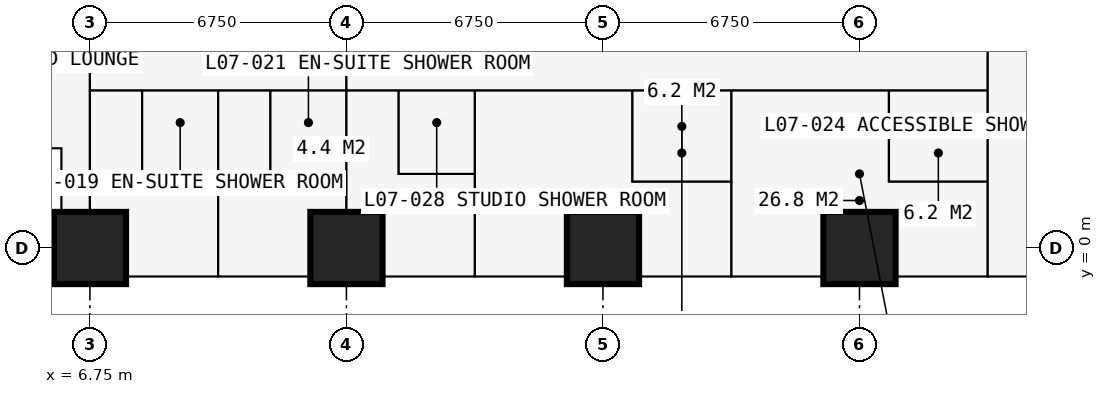
"""IFC4 building model, lengths in metres.
Left out: names, types, materials, properties, quantities, classifications, styles, units other than length and angle.
Written with IfcOpenShell. Run it as: python <this file> out.ifc"""

import sys

from ifc_helpers import new_model, si_unit, direction, frame, frame_2d, origin, origin_2d, place, context, subcontext, project, spatial, rectangle, extrude, element, fill, save


model = new_model("IFC4")
c1 = context("Model", 3, precision=1e-05, world=origin(), true_north=direction((0.0, 1.0)))
c2 = subcontext(c1, "Body", "Model", "MODEL_VIEW")
j1 = project(units=[si_unit("LENGTHUNIT", "METRE"), si_unit("PLANEANGLEUNIT", "RADIAN")], contexts=[c1])
p1 = place(None, origin())
s1 = spatial("IfcSite", under=j1, at=p1, CompositionType="ELEMENT")
p2 = place(p1, origin())
s2 = spatial("IfcBuilding", under=s1, at=p2, CompositionType="ELEMENT")
p3 = place(p2, frame((0.0, 0.0, 28.8)))
s3 = spatial("IfcBuildingStorey", under=s2, at=p3, CompositionType="ELEMENT", Elevation=28.8)
for number, where, z_axis, x_axis in (
    (1, (6.75, 0.0, 0.0), (0.0, 0.0, 1.0), (1.0, 0.0, 0.0)),
    (2, (13.5, 0.0, 0.0), (0.0, 0.0, 1.0), (1.0, 0.0, 0.0)),
    (3, (20.25, 0.0, 0.0), (0.0, 0.0, 1.0), (1.0, 0.0, 0.0)),
    (4, (27.0, 0.0, 0.0), (0.0, 0.0, 1.0), (1.0, 0.0, 0.0)),
):
    element("IfcColumn", number, at=place(p3, frame(where, z_axis=z_axis, x_axis=x_axis)), inside=s3, PredefinedType="COLUMN", context=c2, shape_type="SweptSolid", body=[
        extrude(rectangle(XDim=1.9, YDim=1.9, at=origin_2d()), origin(), (0.0, 0.0, 1.0), 3.6),
    ])
p4 = place(p3, frame((2.625, 2.625, 0.0), z_axis=(0.0, 0.0, 1.0), x_axis=(1.0, 0.0, 0.0)))
e5 = element("IfcWall", 5, at=p4, inside=s3, PredefinedType="SOLIDWALL", context=c2, shape_type="SweptSolid", body=[
    extrude(rectangle(XDim=3.375, YDim=0.3, at=frame_2d((1.688, 0.0))), origin(), (0.0, 0.0, 1.0), 3.375),
])
p5 = place(p4, frame((0.788, 0.0, 0.6)))
e6 = element("IfcOpeningElement", 6, at=p5, cuts=e5, PredefinedType="OPENING", context=c2, shape_type="SweptSolid", body=[
    extrude(rectangle(XDim=1.8, YDim=2.1, at=frame_2d((0.9, 1.05))), frame((0.0, 0.16, 0.0), z_axis=(0.0, -1.0, 0.0), x_axis=(1.0, 0.0, 0.0)), (0.0, 0.0, 1.0), 0.32),
])
p6 = place(p3, frame((6.0, 2.625, 0.0), z_axis=(0.0, 0.0, 1.0), x_axis=(0.0, -1.0, 0.0)))
e7 = element("IfcWall", 7, at=p6, inside=s3, PredefinedType="SOLIDWALL", context=c2, shape_type="SweptSolid", body=[
    extrude(rectangle(XDim=3.375, YDim=0.3, at=frame_2d((1.688, 0.0))), origin(), (0.0, 0.0, 1.0), 3.375),
])
p7 = place(p6, frame((0.317, 0.0, 0.9)))
e8 = element("IfcOpeningElement", 8, at=p7, cuts=e7, PredefinedType="OPENING", context=c2, shape_type="SweptSolid", body=[
    extrude(rectangle(XDim=1.2, YDim=1.8, at=frame_2d((0.6, 0.9))), frame((0.0, 0.16, 0.0), z_axis=(0.0, -1.0, 0.0), x_axis=(1.0, 0.0, 0.0)), (0.0, 0.0, 1.0), 0.32),
])
p8 = place(p3, frame((27.0, -0.75, 0.0), z_axis=(0.0, 0.0, 1.0), x_axis=(-1.0, 0.0, 0.0)))
e9 = element("IfcWall", 9, at=p8, inside=s3, PredefinedType="SOLIDWALL", context=c2, shape_type="SweptSolid", body=[
    extrude(rectangle(XDim=6.75, YDim=0.15, at=frame_2d((3.375, 0.0))), origin(), (0.0, 0.0, 1.0), 3.375),
])
p9 = place(p8, frame((0.996, 0.0, 0.0)))
e10 = element("IfcOpeningElement", 10, at=p9, cuts=e9, PredefinedType="OPENING", context=c2, shape_type="SweptSolid", body=[
    extrude(rectangle(XDim=1.0, YDim=2.2, at=frame_2d((0.5, 1.1))), frame((0.0, 0.085, 0.0), z_axis=(0.0, -1.0, 0.0), x_axis=(1.0, 0.0, 0.0)), (0.0, 0.0, 1.0), 0.17),
])
p10 = place(p8, frame((2.042, 0.0, 0.9)))
e11 = element("IfcOpeningElement", 11, at=p10, cuts=e9, PredefinedType="OPENING", context=c2, shape_type="SweptSolid", body=[
    extrude(rectangle(XDim=1.2, YDim=1.8, at=frame_2d((0.6, 0.9))), frame((0.0, 0.085, 0.0), z_axis=(0.0, -1.0, 0.0), x_axis=(1.0, 0.0, 0.0)), (0.0, 0.0, 1.0), 0.17),
])
p11 = place(p8, frame((4.754, 0.0, 0.0)))
e12 = element("IfcOpeningElement", 12, at=p11, cuts=e9, PredefinedType="OPENING", context=c2, shape_type="SweptSolid", body=[
    extrude(rectangle(XDim=1.0, YDim=2.2, at=frame_2d((0.5, 1.1))), frame((0.0, 0.085, 0.0), z_axis=(0.0, -1.0, 0.0), x_axis=(1.0, 0.0, 0.0)), (0.0, 0.0, 1.0), 0.17),
])
p12 = place(p8, frame((3.508, 0.0, 0.9)))
e13 = element("IfcOpeningElement", 13, at=p12, cuts=e9, PredefinedType="OPENING", context=c2, shape_type="SweptSolid", body=[
    extrude(rectangle(XDim=1.2, YDim=1.8, at=frame_2d((0.6, 0.9))), frame((0.0, 0.085, 0.0), z_axis=(0.0, -1.0, 0.0), x_axis=(1.0, 0.0, 0.0)), (0.0, 0.0, 1.0), 0.17),
])
p13 = place(p3, frame((23.625, -0.85, 0.0), z_axis=(0.0, 0.0, 1.0), x_axis=(0.0, -1.0, 0.0)))
e14 = element("IfcWall", 14, at=p13, inside=s3, PredefinedType="USERDEFINED", context=c2, shape_type="SweptSolid", body=[
    extrude(rectangle(XDim=2.2, YDim=1.0, at=frame_2d((1.1, 0.0))), origin(), (0.0, 0.0, 1.0), 0.9),
])
p14 = place(p3, frame((6.75, -0.734, 0.0), z_axis=(0.0, 0.0, 1.0), x_axis=(0.0, 1.0, 0.0)))
e15 = element("IfcWall", 15, at=p14, inside=s3, PredefinedType="PARTITIONING", context=c2, shape_type="SweptSolid", body=[
    extrude(rectangle(XDim=10.859, YDim=0.15, at=frame_2d((5.429, 0.0))), origin(), (0.0, 0.0, 1.0), 2.877),
])
p15 = place(p3, frame((6.75, 4.15, 0.0), z_axis=(0.0, 0.0, 1.0), x_axis=(1.0, 0.0, 0.0)))
e16 = element("IfcWall", 16, at=p15, inside=s3, PredefinedType="PARTITIONING", context=c2, shape_type="SweptSolid", body=[
    extrude(rectangle(XDim=23.625, YDim=0.15, at=frame_2d((11.812, 0.0))), origin(), (0.0, 0.0, 1.0), 3.375),
])
p16 = place(p15, frame((0.2, 0.0, 0.0)))
e17 = element("IfcOpeningElement", 17, at=p16, cuts=e16, PredefinedType="OPENING", context=c2, shape_type="SweptSolid", body=[
    extrude(rectangle(XDim=0.95, YDim=2.2, at=frame_2d((0.475, 1.1))), frame((0.0, 0.085, 0.0), z_axis=(0.0, -1.0, 0.0), x_axis=(1.0, 0.0, 0.0)), (0.0, 0.0, 1.0), 0.17),
])
p17 = place(p15, frame((3.625, 0.0, 0.0)))
e18 = element("IfcOpeningElement", 18, at=p17, cuts=e16, PredefinedType="OPENING", context=c2, shape_type="SweptSolid", body=[
    extrude(rectangle(XDim=0.95, YDim=2.2, at=frame_2d((0.475, 1.1))), frame((0.0, 0.085, 0.0), z_axis=(0.0, -1.0, 0.0), x_axis=(1.0, 0.0, 0.0)), (0.0, 0.0, 1.0), 0.17),
])
p18 = place(p15, frame((18.475, 0.0, 0.0)))
e19 = element("IfcOpeningElement", 19, at=p18, cuts=e16, PredefinedType="OPENING", context=c2, shape_type="SweptSolid", body=[
    extrude(rectangle(XDim=0.95, YDim=2.2, at=frame_2d((0.475, 1.1))), frame((0.0, 0.085, 0.0), z_axis=(0.0, -1.0, 0.0), x_axis=(1.0, 0.0, 0.0)), (0.0, 0.0, 1.0), 0.17),
])
p19 = place(p15, frame((11.725, 0.0, 0.0)))
e20 = element("IfcOpeningElement", 20, at=p19, cuts=e16, PredefinedType="OPENING", context=c2, shape_type="SweptSolid", body=[
    extrude(rectangle(XDim=0.95, YDim=2.2, at=frame_2d((0.475, 1.1))), frame((0.0, 0.085, 0.0), z_axis=(0.0, -1.0, 0.0), x_axis=(1.0, 0.0, 0.0)), (0.0, 0.0, 1.0), 0.17),
])
p20 = place(p15, frame((6.95, 0.0, 0.0)))
e21 = element("IfcOpeningElement", 21, at=p20, cuts=e16, PredefinedType="OPENING", context=c2, shape_type="SweptSolid", body=[
    extrude(rectangle(XDim=0.95, YDim=2.2, at=frame_2d((0.475, 1.1))), frame((0.0, 0.085, 0.0), z_axis=(0.0, -1.0, 0.0), x_axis=(1.0, 0.0, 0.0)), (0.0, 0.0, 1.0), 0.17),
])
p21 = place(p3, frame((8.125, 1.95, 0.0), z_axis=(0.0, 0.0, 1.0), x_axis=(0.0, 1.0, 0.0)))
e22 = element("IfcWall", 22, at=p21, inside=s3, PredefinedType="PARTITIONING", context=c2, shape_type="SweptSolid", body=[
    extrude(rectangle(XDim=2.2, YDim=0.1, at=frame_2d((1.1, 0.0))), origin(), (0.0, 0.0, 1.0), 3.375),
])
p22 = place(p21, frame((0.65, 0.0, 0.0)))
e23 = element("IfcOpeningElement", 23, at=p22, cuts=e22, PredefinedType="OPENING", context=c2, shape_type="SweptSolid", body=[
    extrude(rectangle(XDim=0.9, YDim=2.2, at=frame_2d((0.45, 1.1))), frame((0.0, 0.06, 0.0), z_axis=(0.0, -1.0, 0.0), x_axis=(1.0, 0.0, 0.0)), (0.0, 0.0, 1.0), 0.12),
])
p23 = place(p3, frame((8.125, 1.95, 0.0), z_axis=(0.0, 0.0, 1.0), x_axis=(1.0, 0.0, 0.0)))
e24 = element("IfcWall", 24, at=p23, inside=s3, PredefinedType="PARTITIONING", context=c2, shape_type="SweptSolid", body=[
    extrude(rectangle(XDim=2.0, YDim=0.1, at=frame_2d((1.0, 0.0))), origin(), (0.0, 0.0, 1.0), 3.375),
])
p24 = place(p3, frame((10.125, -0.734, 0.0), z_axis=(0.0, 0.0, 1.0), x_axis=(0.0, 1.0, 0.0)))
e25 = element("IfcWall", 25, at=p24, inside=s3, PredefinedType="PARTITIONING", context=c2, shape_type="SweptSolid", body=[
    extrude(rectangle(XDim=4.884, YDim=0.175, at=frame_2d((2.442, 0.0))), origin(), (0.0, 0.0, 1.0), 3.375),
])
p25 = place(p3, frame((11.5, 1.95, 0.0), z_axis=(0.0, 0.0, 1.0), x_axis=(0.0, 1.0, 0.0)))
e26 = element("IfcWall", 26, at=p25, inside=s3, PredefinedType="PARTITIONING", context=c2, shape_type="SweptSolid", body=[
    extrude(rectangle(XDim=2.2, YDim=0.1, at=frame_2d((1.1, 0.0))), origin(), (0.0, 0.0, 1.0), 3.375),
])
p26 = place(p25, frame((0.65, 0.0, 0.0)))
e27 = element("IfcOpeningElement", 27, at=p26, cuts=e26, PredefinedType="OPENING", context=c2, shape_type="SweptSolid", body=[
    extrude(rectangle(XDim=0.9, YDim=2.2, at=frame_2d((0.45, 1.1))), frame((0.0, 0.06, 0.0), z_axis=(0.0, -1.0, 0.0), x_axis=(1.0, 0.0, 0.0)), (0.0, 0.0, 1.0), 0.12),
])
p27 = place(p3, frame((11.5, 1.95, 0.0), z_axis=(0.0, 0.0, 1.0), x_axis=(1.0, 0.0, 0.0)))
e28 = element("IfcWall", 28, at=p27, inside=s3, PredefinedType="PARTITIONING", context=c2, shape_type="SweptSolid", body=[
    extrude(rectangle(XDim=2.0, YDim=0.1, at=frame_2d((1.0, 0.0))), origin(), (0.0, 0.0, 1.0), 3.375),
])
p28 = place(p3, frame((13.5, -0.734, 0.0), z_axis=(0.0, 0.0, 1.0), x_axis=(0.0, 1.0, 0.0)))
e29 = element("IfcWall", 29, at=p28, inside=s3, PredefinedType="PARTITIONING", context=c2, shape_type="SweptSolid", body=[
    extrude(rectangle(XDim=12.034, YDim=0.15, at=frame_2d((6.017, 0.0))), origin(), (0.0, 0.0, 1.0), 2.61),
])
p29 = place(p3, frame((14.875, 1.95, 0.0), z_axis=(0.0, 0.0, 1.0), x_axis=(0.0, 1.0, 0.0)))
e30 = element("IfcWall", 30, at=p29, inside=s3, PredefinedType="PARTITIONING", context=c2, shape_type="SweptSolid", body=[
    extrude(rectangle(XDim=2.2, YDim=0.1, at=frame_2d((1.1, 0.0))), origin(), (0.0, 0.0, 1.0), 3.375),
])
p30 = place(p3, frame((14.875, 1.95, 0.0), z_axis=(0.0, 0.0, 1.0), x_axis=(1.0, 0.0, 0.0)))
e31 = element("IfcWall", 31, at=p30, inside=s3, PredefinedType="PARTITIONING", context=c2, shape_type="SweptSolid", body=[
    extrude(rectangle(XDim=2.0, YDim=0.1, at=frame_2d((1.0, 0.0))), origin(), (0.0, 0.0, 1.0), 3.375),
])
p31 = place(p3, frame((16.875, -0.734, 0.0), z_axis=(0.0, 0.0, 1.0), x_axis=(0.0, 1.0, 0.0)))
e32 = element("IfcWall", 32, at=p31, inside=s3, PredefinedType="PARTITIONING", context=c2, shape_type="SweptSolid", body=[
    extrude(rectangle(XDim=4.884, YDim=0.175, at=frame_2d((2.442, 0.0))), origin(), (0.0, 0.0, 1.0), 3.375),
])
p32 = place(p31, frame((3.334, 0.0, 0.0)))
e33 = element("IfcOpeningElement", 33, at=p32, cuts=e32, PredefinedType="OPENING", context=c2, shape_type="SweptSolid", body=[
    extrude(rectangle(XDim=0.9, YDim=2.2, at=frame_2d((0.45, 1.1))), frame((0.0, 0.097, 0.0), z_axis=(0.0, -1.0, 0.0), x_axis=(1.0, 0.0, 0.0)), (0.0, 0.0, 1.0), 0.195),
])
p33 = place(p3, frame((21.025, 1.75, 0.0), z_axis=(0.0, 0.0, 1.0), x_axis=(0.0, 1.0, 0.0)))
e34 = element("IfcWall", 34, at=p33, inside=s3, PredefinedType="PARTITIONING", context=c2, shape_type="SweptSolid", body=[
    extrude(rectangle(XDim=2.4, YDim=0.1, at=frame_2d((1.2, 0.0))), origin(), (0.0, 0.0, 1.0), 3.375),
])
p34 = place(p3, frame((21.025, 1.75, 0.0), z_axis=(0.0, 0.0, 1.0), x_axis=(1.0, 0.0, 0.0)))
e35 = element("IfcWall", 35, at=p34, inside=s3, PredefinedType="PARTITIONING", context=c2, shape_type="SweptSolid", body=[
    extrude(rectangle(XDim=2.6, YDim=0.1, at=frame_2d((1.3, 0.0))), origin(), (0.0, 0.0, 1.0), 3.375),
])
p35 = place(p3, frame((23.625, -0.734, 0.0), z_axis=(0.0, 0.0, 1.0), x_axis=(0.0, 1.0, 0.0)))
e36 = element("IfcWall", 36, at=p35, inside=s3, PredefinedType="PARTITIONING", context=c2, shape_type="SweptSolid", body=[
    extrude(rectangle(XDim=4.884, YDim=0.175, at=frame_2d((2.442, 0.0))), origin(), (0.0, 0.0, 1.0), 3.375),
])
p36 = place(p35, frame((3.234, 0.0, 0.0)))
e37 = element("IfcOpeningElement", 37, at=p36, cuts=e36, PredefinedType="OPENING", context=c2, shape_type="SweptSolid", body=[
    extrude(rectangle(XDim=0.9, YDim=2.2, at=frame_2d((0.45, 1.1))), frame((0.0, 0.097, 0.0), z_axis=(0.0, -1.0, 0.0), x_axis=(1.0, 0.0, 0.0)), (0.0, 0.0, 1.0), 0.195),
])
p37 = place(p3, frame((27.775, 1.75, 0.0), z_axis=(0.0, 0.0, 1.0), x_axis=(0.0, 1.0, 0.0)))
e38 = element("IfcWall", 38, at=p37, inside=s3, PredefinedType="PARTITIONING", context=c2, shape_type="SweptSolid", body=[
    extrude(rectangle(XDim=2.4, YDim=0.1, at=frame_2d((1.2, 0.0))), origin(), (0.0, 0.0, 1.0), 3.375),
])
p38 = place(p3, frame((27.775, 1.75, 0.0), z_axis=(0.0, 0.0, 1.0), x_axis=(1.0, 0.0, 0.0)))
e39 = element("IfcWall", 39, at=p38, inside=s3, PredefinedType="PARTITIONING", context=c2, shape_type="SweptSolid", body=[
    extrude(rectangle(XDim=2.6, YDim=0.1, at=frame_2d((1.3, 0.0))), origin(), (0.0, 0.0, 1.0), 3.375),
])
p39 = place(p38, frame((0.85, 0.0, 0.0)))
e40 = element("IfcOpeningElement", 40, at=p39, cuts=e39, PredefinedType="OPENING", context=c2, shape_type="SweptSolid", body=[
    extrude(rectangle(XDim=0.9, YDim=2.2, at=frame_2d((0.45, 1.1))), frame((0.0, 0.06, 0.0), z_axis=(0.0, -1.0, 0.0), x_axis=(1.0, 0.0, 0.0)), (0.0, 0.0, 1.0), 0.12),
])
p40 = place(p3, frame((30.375, -0.734, 0.0), z_axis=(0.0, 0.0, 1.0), x_axis=(0.0, 1.0, 0.0)))
e41 = element("IfcWall", 41, at=p40, inside=s3, PredefinedType="PARTITIONING", context=c2, shape_type="SweptSolid", body=[
    extrude(rectangle(XDim=12.034, YDim=0.15, at=frame_2d((6.017, 0.0))), origin(), (0.0, 0.0, 1.0), 3.375),
])
p41 = place(p40, frame((5.134, 0.0, 0.0)))
e42 = element("IfcOpeningElement", 42, at=p41, cuts=e41, PredefinedType="OPENING", context=c2, shape_type="SweptSolid", body=[
    extrude(rectangle(XDim=1.0, YDim=2.2, at=frame_2d((0.5, 1.1))), frame((0.0, 0.085, 0.0), z_axis=(0.0, -1.0, 0.0), x_axis=(1.0, 0.0, 0.0)), (0.0, 0.0, 1.0), 0.17),
])
p42 = place(p7, origin())
e43 = element("IfcWindow", 43, at=p42, inside=s3, PartitioningType="SINGLE_PANEL", PredefinedType="WINDOW", context=c2, shape_type="SweptSolid", body=[
    extrude(rectangle(XDim=1.2, YDim=1.8, at=frame_2d((0.6, 0.9))), frame((0.0, 0.03, 0.0), z_axis=(0.0, -1.0, 0.0), x_axis=(1.0, 0.0, 0.0)), (0.0, 0.0, 1.0), 0.06),
])
fill(e8, e43)
p43 = place(p9, origin())
e44 = element("IfcDoor", 44, at=p43, inside=s3, OperationType="SINGLE_SWING_LEFT", PredefinedType="DOOR", context=c2, shape_type="SweptSolid", body=[
    extrude(rectangle(XDim=1.0, YDim=2.2, at=frame_2d((0.5, 1.1))), frame((0.0, 0.025, 0.0), z_axis=(0.0, -1.0, 0.0), x_axis=(1.0, 0.0, 0.0)), (0.0, 0.0, 1.0), 0.05),
])
fill(e10, e44)
p44 = place(p10, origin())
e45 = element("IfcWindow", 45, at=p44, inside=s3, PartitioningType="SINGLE_PANEL", PredefinedType="WINDOW", context=c2, shape_type="SweptSolid", body=[
    extrude(rectangle(XDim=1.2, YDim=1.8, at=frame_2d((0.6, 0.9))), frame((0.0, 0.03, 0.0), z_axis=(0.0, -1.0, 0.0), x_axis=(1.0, 0.0, 0.0)), (0.0, 0.0, 1.0), 0.06),
])
fill(e11, e45)
p45 = place(p11, origin())
e46 = element("IfcDoor", 46, at=p45, inside=s3, OperationType="SINGLE_SWING_RIGHT", PredefinedType="DOOR", context=c2, shape_type="SweptSolid", body=[
    extrude(rectangle(XDim=1.0, YDim=2.2, at=frame_2d((0.5, 1.1))), frame((0.0, 0.025, 0.0), z_axis=(0.0, -1.0, 0.0), x_axis=(1.0, 0.0, 0.0)), (0.0, 0.0, 1.0), 0.05),
])
fill(e12, e46)
p46 = place(p12, origin())
e47 = element("IfcWindow", 47, at=p46, inside=s3, PartitioningType="SINGLE_PANEL", PredefinedType="WINDOW", context=c2, shape_type="SweptSolid", body=[
    extrude(rectangle(XDim=1.2, YDim=1.8, at=frame_2d((0.6, 0.9))), frame((0.0, 0.03, 0.0), z_axis=(0.0, -1.0, 0.0), x_axis=(1.0, 0.0, 0.0)), (0.0, 0.0, 1.0), 0.06),
])
fill(e13, e47)
p47 = place(p16, origin())
e48 = element("IfcDoor", 48, at=p47, inside=s3, OperationType="SINGLE_SWING_LEFT", PredefinedType="DOOR", context=c2, shape_type="SweptSolid", body=[
    extrude(rectangle(XDim=0.95, YDim=2.2, at=frame_2d((0.475, 1.1))), frame((0.0, 0.025, 0.0), z_axis=(0.0, -1.0, 0.0), x_axis=(1.0, 0.0, 0.0)), (0.0, 0.0, 1.0), 0.05),
])
fill(e17, e48)
p48 = place(p22, origin())
e49 = element("IfcDoor", 49, at=p48, inside=s3, OperationType="SINGLE_SWING_RIGHT", PredefinedType="DOOR", context=c2, shape_type="SweptSolid", body=[
    extrude(rectangle(XDim=0.9, YDim=2.2, at=frame_2d((0.45, 1.1))), frame((0.0, 0.025, 0.0), z_axis=(0.0, -1.0, 0.0), x_axis=(1.0, 0.0, 0.0)), (0.0, 0.0, 1.0), 0.05),
])
fill(e23, e49)
p49 = place(p17, origin())
e50 = element("IfcDoor", 50, at=p49, inside=s3, OperationType="SINGLE_SWING_LEFT", PredefinedType="DOOR", context=c2, shape_type="SweptSolid", body=[
    extrude(rectangle(XDim=0.95, YDim=2.2, at=frame_2d((0.475, 1.1))), frame((0.0, 0.025, 0.0), z_axis=(0.0, -1.0, 0.0), x_axis=(1.0, 0.0, 0.0)), (0.0, 0.0, 1.0), 0.05),
])
fill(e18, e50)
p50 = place(p26, origin())
e51 = element("IfcDoor", 51, at=p50, inside=s3, OperationType="SINGLE_SWING_RIGHT", PredefinedType="DOOR", context=c2, shape_type="SweptSolid", body=[
    extrude(rectangle(XDim=0.9, YDim=2.2, at=frame_2d((0.45, 1.1))), frame((0.0, 0.025, 0.0), z_axis=(0.0, -1.0, 0.0), x_axis=(1.0, 0.0, 0.0)), (0.0, 0.0, 1.0), 0.05),
])
fill(e27, e51)
p51 = place(p18, origin())
e52 = element("IfcDoor", 52, at=p51, inside=s3, OperationType="SINGLE_SWING_LEFT", PredefinedType="DOOR", context=c2, shape_type="SweptSolid", body=[
    extrude(rectangle(XDim=0.95, YDim=2.2, at=frame_2d((0.475, 1.1))), frame((0.0, 0.025, 0.0), z_axis=(0.0, -1.0, 0.0), x_axis=(1.0, 0.0, 0.0)), (0.0, 0.0, 1.0), 0.05),
])
fill(e19, e52)
p52 = place(p39, origin())
e53 = element("IfcDoor", 53, at=p52, inside=s3, OperationType="SINGLE_SWING_RIGHT", PredefinedType="DOOR", context=c2, shape_type="SweptSolid", body=[
    extrude(rectangle(XDim=0.9, YDim=2.2, at=frame_2d((0.45, 1.1))), frame((0.0, 0.025, 0.0), z_axis=(0.0, -1.0, 0.0), x_axis=(1.0, 0.0, 0.0)), (0.0, 0.0, 1.0), 0.05),
])
fill(e40, e53)
p53 = place(p19, origin())
e54 = element("IfcDoor", 54, at=p53, inside=s3, OperationType="SINGLE_SWING_LEFT", PredefinedType="DOOR", context=c2, shape_type="SweptSolid", body=[
    extrude(rectangle(XDim=0.95, YDim=2.2, at=frame_2d((0.475, 1.1))), frame((0.0, 0.025, 0.0), z_axis=(0.0, -1.0, 0.0), x_axis=(1.0, 0.0, 0.0)), (0.0, 0.0, 1.0), 0.05),
])
fill(e20, e54)
p54 = place(p36, origin())
e55 = element("IfcDoor", 55, at=p54, inside=s3, OperationType="SINGLE_SWING_RIGHT", PredefinedType="DOOR", context=c2, shape_type="SweptSolid", body=[
    extrude(rectangle(XDim=0.9, YDim=2.2, at=frame_2d((0.45, 1.1))), frame((0.0, 0.025, 0.0), z_axis=(0.0, -1.0, 0.0), x_axis=(1.0, 0.0, 0.0)), (0.0, 0.0, 1.0), 0.05),
])
fill(e37, e55)
p55 = place(p20, origin())
e56 = element("IfcDoor", 56, at=p55, inside=s3, OperationType="SINGLE_SWING_LEFT", PredefinedType="DOOR", context=c2, shape_type="SweptSolid", body=[
    extrude(rectangle(XDim=0.95, YDim=2.2, at=frame_2d((0.475, 1.1))), frame((0.0, 0.025, 0.0), z_axis=(0.0, -1.0, 0.0), x_axis=(1.0, 0.0, 0.0)), (0.0, 0.0, 1.0), 0.05),
])
fill(e21, e56)
p56 = place(p32, origin())
e57 = element("IfcDoor", 57, at=p56, inside=s3, OperationType="SINGLE_SWING_RIGHT", PredefinedType="DOOR", context=c2, shape_type="SweptSolid", body=[
    extrude(rectangle(XDim=0.9, YDim=2.2, at=frame_2d((0.45, 1.1))), frame((0.0, 0.025, 0.0), z_axis=(0.0, -1.0, 0.0), x_axis=(1.0, 0.0, 0.0)), (0.0, 0.0, 1.0), 0.05),
])
fill(e33, e57)
p57 = place(p41, origin())
e58 = element("IfcDoor", 58, at=p57, inside=s3, OperationType="SINGLE_SWING_LEFT", PredefinedType="DOOR", context=c2, shape_type="SweptSolid", body=[
    extrude(rectangle(XDim=1.0, YDim=2.2, at=frame_2d((0.5, 1.1))), frame((0.0, 0.025, 0.0), z_axis=(0.0, -1.0, 0.0), x_axis=(1.0, 0.0, 0.0)), (0.0, 0.0, 1.0), 0.05),
])
fill(e42, e58)
save(model, sys.argv[1])
